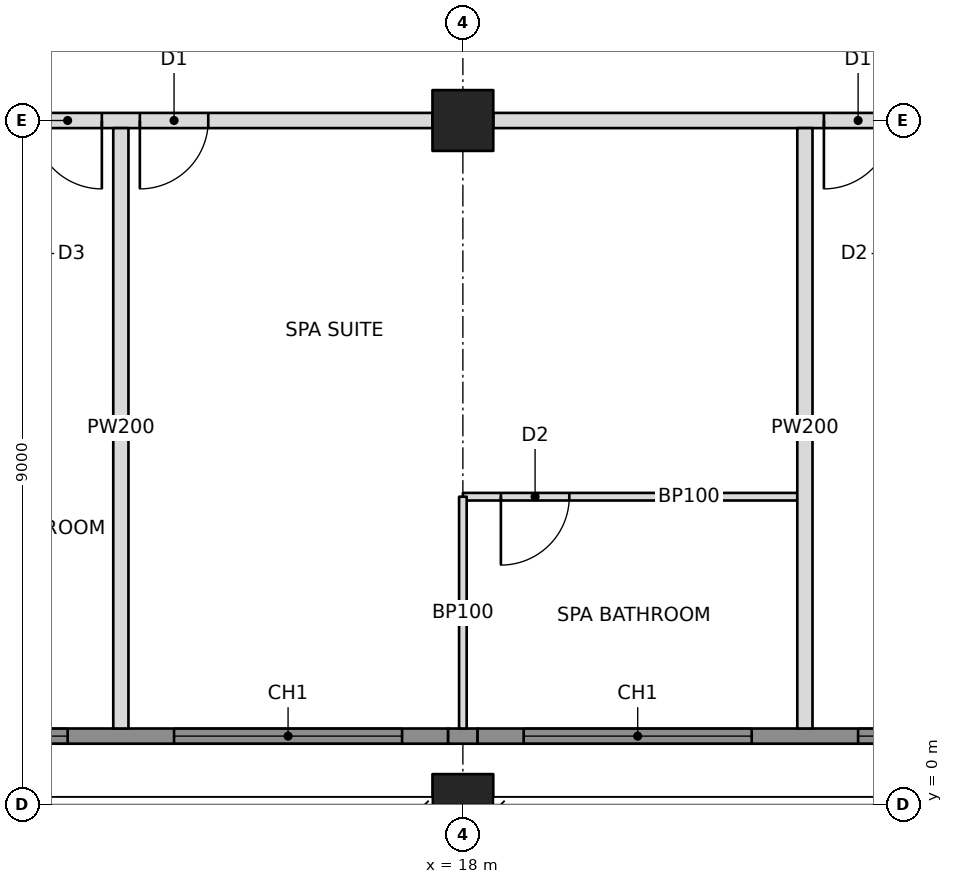
"""IFC4 building model, lengths in metres.
Left out: names, types, materials, properties, quantities, classifications, styles, units other than length and angle.
Written with IfcOpenShell. Run it as: python <this file> out.ifc"""

import sys

from ifc_helpers import new_model, si_unit, direction, frame, frame_2d, origin, origin_2d, place, context, subcontext, project, spatial, rectangle, hollow_rectangle, extrude, element, fill, save


model = new_model("IFC4")
c1 = context("Model", 3, precision=1e-05, world=origin(), true_north=direction((0.0, 1.0)))
c2 = subcontext(c1, "Body", "Model", "MODEL_VIEW")
j1 = project(units=[si_unit("LENGTHUNIT", "METRE"), si_unit("PLANEANGLEUNIT", "RADIAN")], contexts=[c1])
p1 = place(None, origin())
s1 = spatial("IfcSite", under=j1, at=p1, CompositionType="ELEMENT")
p2 = place(p1, origin())
s2 = spatial("IfcBuilding", under=s1, at=p2, CompositionType="ELEMENT")
p3 = place(p2, frame((0.0, 0.0, 51.8)))
s3 = spatial("IfcBuildingStorey", under=s2, at=p3, CompositionType="ELEMENT", Elevation=51.8)
for number, where, z_axis, x_axis in (
    (1, (18.0, 0.0, 0.0), (0.0, 0.0, 1.0), (1.0, 0.0, 0.0)),
    (2, (18.0, 9.0, 0.0), (0.0, 0.0, 1.0), (1.0, 0.0, 0.0)),
):
    element("IfcColumn", number, at=place(p3, frame(where, z_axis=z_axis, x_axis=x_axis)), inside=s3, PredefinedType="COLUMN", context=c2, shape_type="SweptSolid", body=[
        extrude(hollow_rectangle(XDim=0.8, YDim=0.8, WallThickness=0.1, at=origin_2d()), origin(), (0.0, 0.0, 1.0), 3.4),
    ])
p4 = place(p3, frame((9.4, 9.0, 0.0), z_axis=(0.0, 0.0, 1.0), x_axis=(1.0, 0.0, 0.0)))
e3 = element("IfcWall", 3, at=p4, inside=s3, PredefinedType="PARTITIONING", context=c2, shape_type="SweptSolid", body=[
    extrude(rectangle(XDim=8.2, YDim=0.2, at=frame_2d((4.1, 0.0))), origin(), (0.0, 0.0, 1.0), 2.405),
])
p5 = place(p4, frame((2.95, 0.0, 0.0)))
e4 = element("IfcOpeningElement", 4, at=p5, cuts=e3, PredefinedType="OPENING", context=c2, shape_type="SweptSolid", body=[
    extrude(rectangle(XDim=0.9, YDim=2.1, at=frame_2d((0.45, 1.05))), frame((0.0, 0.11, 0.0), z_axis=(0.0, -1.0, 0.0), x_axis=(1.0, 0.0, 0.0)), (0.0, 0.0, 1.0), 0.22),
])
p6 = place(p4, frame((4.35, 0.0, 0.0)))
e5 = element("IfcOpeningElement", 5, at=p6, cuts=e3, PredefinedType="OPENING", context=c2, shape_type="SweptSolid", body=[
    extrude(rectangle(XDim=0.9, YDim=2.1, at=frame_2d((0.45, 1.05))), frame((0.0, 0.11, 0.0), z_axis=(0.0, -1.0, 0.0), x_axis=(1.0, 0.0, 0.0)), (0.0, 0.0, 1.0), 0.22),
])
p7 = place(p3, frame((18.4, 9.0, 0.0), z_axis=(0.0, 0.0, 1.0), x_axis=(1.0, 0.0, 0.0)))
e6 = element("IfcWall", 6, at=p7, inside=s3, PredefinedType="PARTITIONING", context=c2, shape_type="SweptSolid", body=[
    extrude(rectangle(XDim=8.2, YDim=0.2, at=frame_2d((4.1, 0.0))), origin(), (0.0, 0.0, 1.0), 2.405),
])
p8 = place(p7, frame((4.35, 0.0, 0.0)))
e7 = element("IfcOpeningElement", 7, at=p8, cuts=e6, PredefinedType="OPENING", context=c2, shape_type="SweptSolid", body=[
    extrude(rectangle(XDim=0.9, YDim=2.1, at=frame_2d((0.45, 1.05))), frame((0.0, 0.11, 0.0), z_axis=(0.0, -1.0, 0.0), x_axis=(1.0, 0.0, 0.0)), (0.0, 0.0, 1.0), 0.22),
])
for number, where, z_axis, x_axis in (
    (8, (13.5, 8.9, 0.0), (0.0, 0.0, 1.0), (0.0, -1.0, 0.0)),
    (9, (22.5, 8.9, 0.0), (0.0, 0.0, 1.0), (0.0, -1.0, 0.0)),
):
    element("IfcWall", number, at=place(p3, frame(where, z_axis=z_axis, x_axis=x_axis)), inside=s3, PredefinedType="PARTITIONING", context=c2, shape_type="SweptSolid", body=[
        extrude(rectangle(XDim=7.9, YDim=0.2, at=frame_2d((3.95, 0.0))), origin(), (0.0, 0.0, 1.0), 2.404),
    ])
p9 = place(p3, frame((18.0, 4.05, 0.0), z_axis=(0.0, 0.0, 1.0), x_axis=(1.0, 0.0, 0.0)))
e10 = element("IfcWall", 10, at=p9, inside=s3, PredefinedType="PARTITIONING", context=c2, shape_type="SweptSolid", body=[
    extrude(rectangle(XDim=4.4, YDim=0.1, at=frame_2d((2.2, 0.0))), origin(), (0.0, 0.0, 1.0), 2.404),
])
p10 = place(p9, frame((0.5, 0.0, 0.0)))
e11 = element("IfcOpeningElement", 11, at=p10, cuts=e10, PredefinedType="OPENING", context=c2, shape_type="SweptSolid", body=[
    extrude(rectangle(XDim=0.9, YDim=2.1, at=frame_2d((0.45, 1.05))), frame((0.0, 0.06, 0.0), z_axis=(0.0, -1.0, 0.0), x_axis=(1.0, 0.0, 0.0)), (0.0, 0.0, 1.0), 0.12),
])
p11 = place(p3, frame((18.0, 4.05, 0.0), z_axis=(0.0, 0.0, 1.0), x_axis=(0.0, -1.0, 0.0)))
e12 = element("IfcWall", 12, at=p11, inside=s3, PredefinedType="PARTITIONING", context=c2, shape_type="SweptSolid", body=[
    extrude(rectangle(XDim=3.05, YDim=0.1, at=frame_2d((1.525, 0.0))), origin(), (0.0, 0.0, 1.0), 2.405),
])
p12 = place(p3, frame((9.135, 0.9, 0.0), z_axis=(0.0, 0.0, 1.0), x_axis=(1.0, 0.0, 0.0)))
e13 = element("IfcWall", 13, at=p12, inside=s3, PredefinedType="SOLIDWALL", context=c2, shape_type="SweptSolid", body=[
    extrude(rectangle(XDim=8.671, YDim=0.2, at=frame_2d((4.335, 0.0))), origin(), (0.0, 0.0, 1.0), 3.2),
])
p13 = place(p12, frame((0.665, 0.0, 0.6)))
e14 = element("IfcOpeningElement", 14, at=p13, cuts=e13, PredefinedType="OPENING", context=c2, shape_type="SweptSolid", body=[
    extrude(rectangle(XDim=3.0, YDim=2.2, at=frame_2d((1.5, 1.1))), frame((0.0, 0.11, 0.0), z_axis=(0.0, -1.0, 0.0), x_axis=(1.0, 0.0, 0.0)), (0.0, 0.0, 1.0), 0.22),
])
p14 = place(p12, frame((5.065, 0.0, 0.6)))
e15 = element("IfcOpeningElement", 15, at=p14, cuts=e13, PredefinedType="OPENING", context=c2, shape_type="SweptSolid", body=[
    extrude(rectangle(XDim=3.0, YDim=2.2, at=frame_2d((1.5, 1.1))), frame((0.0, 0.11, 0.0), z_axis=(0.0, -1.0, 0.0), x_axis=(1.0, 0.0, 0.0)), (0.0, 0.0, 1.0), 0.22),
])
p15 = place(p3, frame((17.806, 0.9, 0.0), z_axis=(0.0, 0.0, 1.0), x_axis=(1.0, 0.0, 0.0)))
e16 = element("IfcWall", 16, at=p15, inside=s3, PredefinedType="SOLIDWALL", context=c2, shape_type="SweptSolid", body=[
    extrude(rectangle(XDim=0.388, YDim=0.2, at=frame_2d((0.194, 0.0))), origin(), (0.0, 0.0, 1.0), 2.404),
])
p16 = place(p3, frame((18.194, 0.9, 0.0), z_axis=(0.0, 0.0, 1.0), x_axis=(1.0, 0.0, 0.0)))
e17 = element("IfcWall", 17, at=p16, inside=s3, PredefinedType="SOLIDWALL", context=c2, shape_type="SweptSolid", body=[
    extrude(rectangle(XDim=8.612, YDim=0.2, at=frame_2d((4.306, 0.0))), origin(), (0.0, 0.0, 1.0), 3.2),
])
p17 = place(p16, frame((0.606, 0.0, 0.6)))
e18 = element("IfcOpeningElement", 18, at=p17, cuts=e17, PredefinedType="OPENING", context=c2, shape_type="SweptSolid", body=[
    extrude(rectangle(XDim=3.0, YDim=2.2, at=frame_2d((1.5, 1.1))), frame((0.0, 0.11, 0.0), z_axis=(0.0, -1.0, 0.0), x_axis=(1.0, 0.0, 0.0)), (0.0, 0.0, 1.0), 0.22),
])
p18 = place(p16, frame((5.006, 0.0, 0.6)))
e19 = element("IfcOpeningElement", 19, at=p18, cuts=e17, PredefinedType="OPENING", context=c2, shape_type="SweptSolid", body=[
    extrude(rectangle(XDim=3.0, YDim=2.2, at=frame_2d((1.5, 1.1))), frame((0.0, 0.11, 0.0), z_axis=(0.0, -1.0, 0.0), x_axis=(1.0, 0.0, 0.0)), (0.0, 0.0, 1.0), 0.22),
])
p19 = place(p13, origin())
e20 = element("IfcWindow", 20, at=p19, inside=s3, PartitioningType="TRIPLE_PANEL_VERTICAL", PredefinedType="WINDOW", context=c2, shape_type="SweptSolid", body=[
    extrude(rectangle(XDim=3.0, YDim=2.2, at=frame_2d((1.5, 1.1))), frame((0.0, 0.03, 0.0), z_axis=(0.0, -1.0, 0.0), x_axis=(1.0, 0.0, 0.0)), (0.0, 0.0, 1.0), 0.06),
])
fill(e14, e20)
p20 = place(p14, origin())
e21 = element("IfcWindow", 21, at=p20, inside=s3, PartitioningType="TRIPLE_PANEL_VERTICAL", PredefinedType="WINDOW", context=c2, shape_type="SweptSolid", body=[
    extrude(rectangle(XDim=3.0, YDim=2.2, at=frame_2d((1.5, 1.1))), frame((0.0, 0.03, 0.0), z_axis=(0.0, -1.0, 0.0), x_axis=(1.0, 0.0, 0.0)), (0.0, 0.0, 1.0), 0.06),
])
fill(e15, e21)
p21 = place(p17, origin())
e22 = element("IfcWindow", 22, at=p21, inside=s3, PartitioningType="TRIPLE_PANEL_VERTICAL", PredefinedType="WINDOW", context=c2, shape_type="SweptSolid", body=[
    extrude(rectangle(XDim=3.0, YDim=2.2, at=frame_2d((1.5, 1.1))), frame((0.0, 0.03, 0.0), z_axis=(0.0, -1.0, 0.0), x_axis=(1.0, 0.0, 0.0)), (0.0, 0.0, 1.0), 0.06),
])
fill(e18, e22)
p22 = place(p18, origin())
e23 = element("IfcWindow", 23, at=p22, inside=s3, PartitioningType="TRIPLE_PANEL_VERTICAL", PredefinedType="WINDOW", context=c2, shape_type="SweptSolid", body=[
    extrude(rectangle(XDim=3.0, YDim=2.2, at=frame_2d((1.5, 1.1))), frame((0.0, 0.03, 0.0), z_axis=(0.0, -1.0, 0.0), x_axis=(1.0, 0.0, 0.0)), (0.0, 0.0, 1.0), 0.06),
])
fill(e19, e23)
p23 = place(p5, frame((0.9, 0.0, 0.0), z_axis=(0.0, 0.0, 1.0), x_axis=(-1.0, 0.0, 0.0)))
e24 = element("IfcDoor", 24, at=p23, inside=s3, OperationType="SINGLE_SWING_LEFT", PredefinedType="DOOR", context=c2, shape_type="SweptSolid", body=[
    extrude(rectangle(XDim=0.9, YDim=2.1, at=frame_2d((0.45, 1.05))), frame((0.0, 0.025, 0.0), z_axis=(0.0, -1.0, 0.0), x_axis=(1.0, 0.0, 0.0)), (0.0, 0.0, 1.0), 0.05),
])
fill(e4, e24)
p24 = place(p10, frame((0.9, 0.0, 0.0), z_axis=(0.0, 0.0, 1.0), x_axis=(-1.0, 0.0, 0.0)))
e25 = element("IfcDoor", 25, at=p24, inside=s3, OperationType="SINGLE_SWING_RIGHT", PredefinedType="DOOR", context=c2, shape_type="SweptSolid", body=[
    extrude(rectangle(XDim=0.9, YDim=2.1, at=frame_2d((0.45, 1.05))), frame((0.0, 0.025, 0.0), z_axis=(0.0, -1.0, 0.0), x_axis=(1.0, 0.0, 0.0)), (0.0, 0.0, 1.0), 0.05),
])
fill(e11, e25)
p25 = place(p6, frame((0.9, 0.0, 0.0), z_axis=(0.0, 0.0, 1.0), x_axis=(-1.0, 0.0, 0.0)))
e26 = element("IfcDoor", 26, at=p25, inside=s3, OperationType="SINGLE_SWING_RIGHT", PredefinedType="DOOR", context=c2, shape_type="SweptSolid", body=[
    extrude(rectangle(XDim=0.9, YDim=2.1, at=frame_2d((0.45, 1.05))), frame((0.0, 0.025, 0.0), z_axis=(0.0, -1.0, 0.0), x_axis=(1.0, 0.0, 0.0)), (0.0, 0.0, 1.0), 0.05),
])
fill(e5, e26)
p26 = place(p8, frame((0.9, 0.0, 0.0), z_axis=(0.0, 0.0, 1.0), x_axis=(-1.0, 0.0, 0.0)))
e27 = element("IfcDoor", 27, at=p26, inside=s3, OperationType="SINGLE_SWING_RIGHT", PredefinedType="DOOR", context=c2, shape_type="SweptSolid", body=[
    extrude(rectangle(XDim=0.9, YDim=2.1, at=frame_2d((0.45, 1.05))), frame((0.0, 0.025, 0.0), z_axis=(0.0, -1.0, 0.0), x_axis=(1.0, 0.0, 0.0)), (0.0, 0.0, 1.0), 0.05),
])
fill(e7, e27)
save(model, sys.argv[1])
